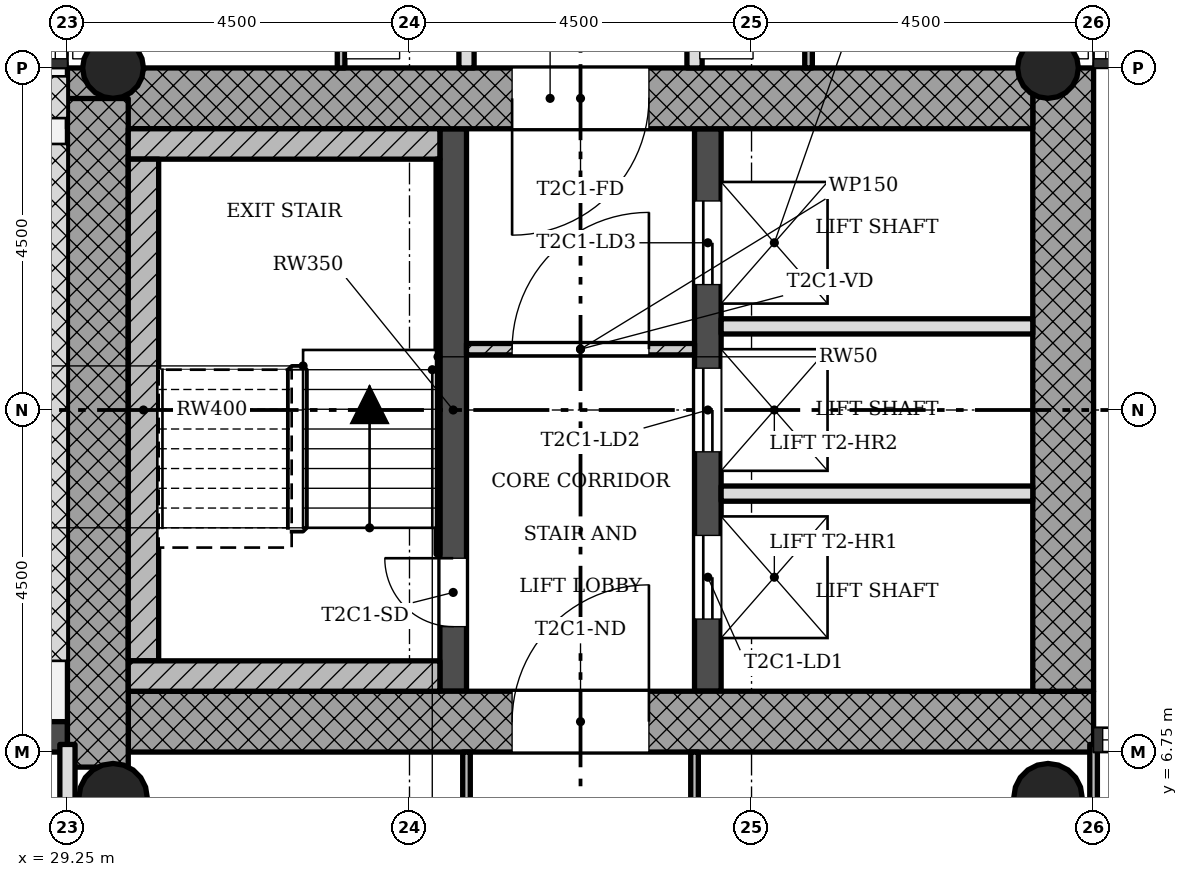
"""IFC4 building model, lengths in metres.
Left out: names, types, materials, properties, quantities, classifications, styles, units other than length and angle.
Written with IfcOpenShell. Run it as: python <this file> out.ifc"""

import sys

from ifc_helpers import new_model, si_unit, direction, frame, frame_2d, origin, origin_2d, place, context, subcontext, project, spatial, rectangle, hollow_circle, extrude, element, fill, save


model = new_model("IFC4")
c1 = context("Model", 3, precision=1e-05, world=origin(), true_north=direction((0.0, 1.0)))
c2 = subcontext(c1, "Body", "Model", "MODEL_VIEW")
j1 = project(units=[si_unit("LENGTHUNIT", "METRE"), si_unit("PLANEANGLEUNIT", "RADIAN")], contexts=[c1])
p1 = place(None, origin())
s1 = spatial("IfcSite", under=j1, at=p1, CompositionType="ELEMENT")
p2 = place(p1, origin())
s2 = spatial("IfcBuilding", under=s1, at=p2, CompositionType="ELEMENT")
p3 = place(p2, frame((0.0, 0.0, 167.7)))
s3 = spatial("IfcBuildingStorey", under=s2, at=p3, CompositionType="ELEMENT", Elevation=167.7)
p4 = place(p3, frame((30.05, 7.15, 0.0), z_axis=(0.0, 0.0, 1.0), x_axis=(1.0, 0.0, 0.0)))
e1 = element("IfcWall", 1, at=p4, inside=s3, PredefinedType="SHEAR", context=c2, shape_type="SweptSolid", body=[
    extrude(rectangle(XDim=12.7, YDim=0.8, at=frame_2d((6.35, 0.0))), origin(), (0.0, 0.0, 1.0), 3.4),
])
p5 = place(p4, frame((5.05, 0.0, 0.0)))
e2 = element("IfcOpeningElement", 2, at=p5, cuts=e1, PredefinedType="OPENING", context=c2, shape_type="SweptSolid", body=[
    extrude(rectangle(XDim=1.8, YDim=2.1, at=frame_2d((0.9, 1.05))), frame((0.0, 0.41, 0.0), z_axis=(0.0, -1.0, 0.0), x_axis=(1.0, 0.0, 0.0)), (0.0, 0.0, 1.0), 0.82),
])
p6 = place(p3, frame((42.35, 7.55, 0.0), z_axis=(0.0, 0.0, 1.0), x_axis=(0.0, 1.0, 0.0)))
e3 = element("IfcWall", 3, at=p6, inside=s3, PredefinedType="SHEAR", context=c2, shape_type="SweptSolid", body=[
    extrude(rectangle(XDim=8.2, YDim=0.8, at=frame_2d((4.1, 0.0))), origin(), (0.0, 0.0, 1.0), 3.4),
])
p7 = place(p3, frame((41.95, 15.35, 0.0), z_axis=(0.0, 0.0, 1.0), x_axis=(-1.0, 0.0, 0.0)))
e4 = element("IfcWall", 4, at=p7, inside=s3, PredefinedType="SHEAR", context=c2, shape_type="SweptSolid", body=[
    extrude(rectangle(XDim=12.7, YDim=0.8, at=frame_2d((6.35, 0.0))), origin(), (0.0, 0.0, 1.0), 3.4),
])
p8 = place(p7, frame((5.05, 0.0, 0.0)))
e5 = element("IfcOpeningElement", 5, at=p8, cuts=e4, PredefinedType="OPENING", context=c2, shape_type="SweptSolid", body=[
    extrude(rectangle(XDim=1.8, YDim=2.1, at=frame_2d((0.9, 1.05))), frame((0.0, 0.41, 0.0), z_axis=(0.0, -1.0, 0.0), x_axis=(1.0, 0.0, 0.0)), (0.0, 0.0, 1.0), 0.82),
])
p9 = place(p3, frame((29.65, 15.348, 0.0), z_axis=(0.0, 0.0, 1.0), x_axis=(0.0, -1.0, 0.0)))
e6 = element("IfcWall", 6, at=p9, inside=s3, PredefinedType="SHEAR", context=c2, shape_type="SweptSolid", body=[
    extrude(rectangle(XDim=8.796, YDim=0.8, at=frame_2d((4.398, 0.0))), origin(), (0.0, 0.0, 1.0), 3.4),
])
p10 = place(p3, frame((34.325, 7.55, 0.0), z_axis=(0.0, 0.0, 1.0), x_axis=(0.0, 1.0, 0.0)))
e7 = element("IfcWall", 7, at=p10, inside=s3, PredefinedType="SHEAR", context=c2, shape_type="SweptSolid", body=[
    extrude(rectangle(XDim=7.4, YDim=0.35, at=frame_2d((3.7, 0.0))), origin(), (0.0, 0.0, 1.0), 3.4),
])
p11 = place(p10, frame((0.85, 0.0, 0.0)))
e8 = element("IfcOpeningElement", 8, at=p11, cuts=e7, PredefinedType="OPENING", context=c2, shape_type="SweptSolid", body=[
    extrude(rectangle(XDim=0.9, YDim=2.1, at=frame_2d((0.45, 1.05))), frame((0.0, 0.185, 0.0), z_axis=(0.0, -1.0, 0.0), x_axis=(1.0, 0.0, 0.0)), (0.0, 0.0, 1.0), 0.37),
])
p12 = place(p3, frame((37.675, 7.55, 0.0), z_axis=(0.0, 0.0, 1.0), x_axis=(0.0, 1.0, 0.0)))
e9 = element("IfcWall", 9, at=p12, inside=s3, PredefinedType="SHEAR", context=c2, shape_type="SweptSolid", body=[
    extrude(rectangle(XDim=7.4, YDim=0.35, at=frame_2d((3.7, 0.0))), origin(), (0.0, 0.0, 1.0), 3.4),
])
p13 = place(p12, frame((0.95, 0.0, 0.0)))
e10 = element("IfcOpeningElement", 10, at=p13, cuts=e9, PredefinedType="OPENING", context=c2, shape_type="SweptSolid", body=[
    extrude(rectangle(XDim=1.1, YDim=2.1, at=frame_2d((0.55, 1.05))), frame((0.0, 0.185, 0.0), z_axis=(0.0, -1.0, 0.0), x_axis=(1.0, 0.0, 0.0)), (0.0, 0.0, 1.0), 0.37),
])
p14 = place(p12, frame((3.15, 0.0, 0.0)))
e11 = element("IfcOpeningElement", 11, at=p14, cuts=e9, PredefinedType="OPENING", context=c2, shape_type="SweptSolid", body=[
    extrude(rectangle(XDim=1.1, YDim=2.1, at=frame_2d((0.55, 1.05))), frame((0.0, 0.185, 0.0), z_axis=(0.0, -1.0, 0.0), x_axis=(1.0, 0.0, 0.0)), (0.0, 0.0, 1.0), 0.37),
])
p15 = place(p12, frame((5.35, 0.0, 0.0)))
e12 = element("IfcOpeningElement", 12, at=p15, cuts=e9, PredefinedType="OPENING", context=c2, shape_type="SweptSolid", body=[
    extrude(rectangle(XDim=1.1, YDim=2.1, at=frame_2d((0.55, 1.05))), frame((0.0, 0.185, 0.0), z_axis=(0.0, -1.0, 0.0), x_axis=(1.0, 0.0, 0.0)), (0.0, 0.0, 1.0), 0.37),
])
for number, where, z_axis, x_axis in (
    (13, (42.15, 15.75, 0.0), (0.0, 0.0, 1.0), (1.0, 0.0, 0.0)),
    (14, (29.85, 15.75, 0.0), (0.0, 0.0, 1.0), (1.0, 0.0, 0.0)),
):
    element("IfcColumn", number, at=place(p3, frame(where, z_axis=z_axis, x_axis=x_axis)), inside=s3, PredefinedType="COLUMN", context=c2, shape_type="SweptSolid", body=[
        extrude(hollow_circle(Radius=0.4, WallThickness=0.028, at=origin_2d()), origin(), (0.0, 0.0, 1.0), 3.4),
    ])
for number, where, z_axis, x_axis in (
    (15, (42.15, 6.15, 0.0), (0.0, 0.0, 1.0), (1.0, 0.0, 0.0)),
    (16, (29.85, 6.15, 0.0), (0.0, 0.0, 1.0), (1.0, 0.0, 0.0)),
):
    element("IfcColumn", number, at=place(p3, frame(where, z_axis=z_axis, x_axis=x_axis)), inside=s3, PredefinedType="COLUMN", context=c2, shape_type="SweptSolid", body=[
        extrude(hollow_circle(Radius=0.45, WallThickness=0.032, at=origin_2d()), origin(), (0.0, 0.0, 1.0), 3.4),
    ])
p16 = place(p3, frame((29.25, 6.95, -0.02), z_axis=(0.0, 0.0, 1.0), x_axis=(-1.0, 0.0, 0.0)))
e17 = element("IfcWall", 17, at=p16, inside=s3, PredefinedType="STANDARD", context=c2, shape_type="SweptSolid", body=[
    extrude(rectangle(XDim=4.5, YDim=0.4, at=frame_2d((2.25, 0.0))), origin(), (0.0, 0.0, 1.0), 3.12),
])
p17 = place(p16, frame((1.35, 0.0, 0.02)))
e18 = element("IfcOpeningElement", 18, at=p17, cuts=e17, PredefinedType="OPENING", context=c2, shape_type="SweptSolid", body=[
    extrude(rectangle(XDim=1.8, YDim=2.1, at=frame_2d((0.9, 1.05))), frame((0.0, 0.21, 0.0), z_axis=(0.0, -1.0, 0.0), x_axis=(1.0, 0.0, 0.0)), (0.0, 0.0, 1.0), 0.42),
])
p18 = place(p3, frame((37.5, 12.05, 0.0), z_axis=(0.0, 0.0, 1.0), x_axis=(-1.0, 0.0, 0.0)))
e19 = element("IfcWall", 19, at=p18, inside=s3, PredefinedType="PARTITIONING", context=c2, shape_type="SweptSolid", body=[
    extrude(rectangle(XDim=3.0, YDim=0.15, at=frame_2d((1.5, 0.0))), origin(), (0.0, 0.0, 1.0), 3.0),
])
p19 = place(p18, frame((0.6, 0.0, 0.0)))
e20 = element("IfcOpeningElement", 20, at=p19, cuts=e19, PredefinedType="OPENING", context=c2, shape_type="SweptSolid", body=[
    extrude(rectangle(XDim=1.8, YDim=2.1, at=frame_2d((0.9, 1.05))), frame((0.0, 0.085, 0.0), z_axis=(0.0, -1.0, 0.0), x_axis=(1.0, 0.0, 0.0)), (0.0, 0.0, 1.0), 0.17),
])
for number, where, z_axis, x_axis in (
    (21, (41.95, 10.15, 0.0), (0.0, 0.0, 1.0), (-1.0, 0.0, 0.0)),
    (22, (41.95, 12.35, 0.0), (0.0, 0.0, 1.0), (-1.0, 0.0, 0.0)),
):
    element("IfcWall", number, at=place(p3, frame(where, z_axis=z_axis, x_axis=x_axis)), inside=s3, PredefinedType="SOLIDWALL", context=c2, shape_type="SweptSolid", body=[
        extrude(rectangle(XDim=4.1, YDim=0.2, at=frame_2d((2.05, 0.0))), origin(), (0.0, 0.0, 1.0), 3.0),
    ])
p20 = place(p3, frame((42.75, 0.9, 0.0), z_axis=(0.0, 0.0, 1.0), x_axis=(0.0, 1.0, 0.0)))
e23 = element("IfcWall", 23, at=p20, inside=s3, PredefinedType="PARTITIONING", context=c2, shape_type="SweptSolid", body=[
    extrude(rectangle(XDim=5.95, YDim=0.1, at=frame_2d((2.975, 0.0))), origin(), (0.0, 0.0, 1.0), 3.0),
])
p21 = place(p3, frame((39.0, 15.75, 0.0), z_axis=(0.0, 0.0, 1.0), x_axis=(0.0, 1.0, 0.0)))
e24 = element("IfcWall", 24, at=p21, inside=s3, PredefinedType="PARTITIONING", context=c2, shape_type="SweptSolid", body=[
    extrude(rectangle(XDim=2.4, YDim=0.1, at=frame_2d((1.2, 0.0))), origin(), (0.0, 0.0, 1.0), 3.0),
])
p22 = place(p21, frame((0.75, 0.0, 0.0)))
e25 = element("IfcOpeningElement", 25, at=p22, cuts=e24, PredefinedType="OPENING", context=c2, shape_type="SweptSolid", body=[
    extrude(rectangle(XDim=0.9, YDim=2.1, at=frame_2d((0.45, 1.05))), frame((0.0, 0.06, 0.0), z_axis=(0.0, -1.0, 0.0), x_axis=(1.0, 0.0, 0.0)), (0.0, 0.0, 1.0), 0.12),
])
p23 = place(p3, frame((37.5, 4.5, 0.0), z_axis=(0.0, 0.0, 1.0), x_axis=(0.0, 1.0, 0.0)))
e26 = element("IfcWall", 26, at=p23, inside=s3, PredefinedType="PARTITIONING", context=c2, shape_type="SweptSolid", body=[
    extrude(rectangle(XDim=2.25, YDim=0.1, at=frame_2d((1.125, 0.0))), origin(), (0.0, 0.0, 1.0), 3.0),
])
p24 = place(p3, frame((37.5, 15.75, 0.0), z_axis=(0.0, 0.0, 1.0), x_axis=(0.0, 1.0, 0.0)))
e27 = element("IfcWall", 27, at=p24, inside=s3, PredefinedType="SOLIDWALL", context=c2, shape_type="SweptSolid", body=[
    extrude(rectangle(XDim=4.5, YDim=0.2, at=frame_2d((2.25, 0.0))), origin(), (0.0, 0.0, 1.0), 3.0),
])
p25 = place(p24, frame((3.0, 0.0, 0.0)))
e28 = element("IfcOpeningElement", 28, at=p25, cuts=e27, PredefinedType="OPENING", context=c2, shape_type="SweptSolid", body=[
    extrude(rectangle(XDim=0.9, YDim=2.1, at=frame_2d((0.45, 1.05))), frame((0.0, 0.11, 0.0), z_axis=(0.0, -1.0, 0.0), x_axis=(1.0, 0.0, 0.0)), (0.0, 0.0, 1.0), 0.22),
])
p26 = place(p3, frame((34.5, 4.5, 0.0), z_axis=(0.0, 0.0, 1.0), x_axis=(0.0, 1.0, 0.0)))
e29 = element("IfcWall", 29, at=p26, inside=s3, PredefinedType="PARTITIONING", context=c2, shape_type="SweptSolid", body=[
    extrude(rectangle(XDim=2.25, YDim=0.1, at=frame_2d((1.125, 0.0))), origin(), (0.0, 0.0, 1.0), 3.0),
])
p27 = place(p3, frame((34.5, 15.75, 0.0), z_axis=(0.0, 0.0, 1.0), x_axis=(0.0, 1.0, 0.0)))
e30 = element("IfcWall", 30, at=p27, inside=s3, PredefinedType="SOLIDWALL", context=c2, shape_type="SweptSolid", body=[
    extrude(rectangle(XDim=4.5, YDim=0.2, at=frame_2d((2.25, 0.0))), origin(), (0.0, 0.0, 1.0), 3.0),
])
p28 = place(p27, frame((3.0, 0.0, 0.0)))
e31 = element("IfcOpeningElement", 31, at=p28, cuts=e30, PredefinedType="OPENING", context=c2, shape_type="SweptSolid", body=[
    extrude(rectangle(XDim=0.9, YDim=2.1, at=frame_2d((0.45, 1.05))), frame((0.0, 0.11, 0.0), z_axis=(0.0, -1.0, 0.0), x_axis=(1.0, 0.0, 0.0)), (0.0, 0.0, 1.0), 0.22),
])
p29 = place(p3, frame((32.85, 15.75, 0.0), z_axis=(0.0, 0.0, 1.0), x_axis=(0.0, 1.0, 0.0)))
e32 = element("IfcWall", 32, at=p29, inside=s3, PredefinedType="PARTITIONING", context=c2, shape_type="SweptSolid", body=[
    extrude(rectangle(XDim=4.5, YDim=0.1, at=frame_2d((2.25, 0.0))), origin(), (0.0, 0.0, 1.0), 3.0),
])
p30 = place(p29, frame((3.0, 0.0, 0.0)))
e33 = element("IfcOpeningElement", 33, at=p30, cuts=e32, PredefinedType="OPENING", context=c2, shape_type="SweptSolid", body=[
    extrude(rectangle(XDim=0.9, YDim=2.1, at=frame_2d((0.45, 1.05))), frame((0.0, 0.06, 0.0), z_axis=(0.0, -1.0, 0.0), x_axis=(1.0, 0.0, 0.0)), (0.0, 0.0, 1.0), 0.12),
])
p31 = place(p3, frame((29.25, 0.9, 0.0), z_axis=(0.0, 0.0, 1.0), x_axis=(0.0, 1.0, 0.0)))
e34 = element("IfcWall", 34, at=p31, inside=s3, PredefinedType="SOLIDWALL", context=c2, shape_type="SweptSolid", body=[
    extrude(rectangle(XDim=5.95, YDim=0.2, at=frame_2d((2.975, 0.0))), origin(), (0.0, 0.0, 1.0), 3.0),
])
p32 = place(p3, frame((34.15, 14.75, 0.0), z_axis=(0.0, 0.0, 1.0), x_axis=(-1.0, 0.0, 0.0)))
e35 = element("IfcWall", 35, at=p32, inside=s3, PredefinedType="SHEAR", context=c2, shape_type="SweptSolid", body=[
    extrude(rectangle(XDim=4.1, YDim=0.4, at=frame_2d((2.05, 0.0))), origin(), (0.0, 0.0, 1.0), 3.4),
])
p33 = place(p3, frame((30.25, 7.95, 0.0), z_axis=(0.0, 0.0, 1.0), x_axis=(0.0, 1.0, 0.0)))
e36 = element("IfcWall", 36, at=p33, inside=s3, PredefinedType="SHEAR", context=c2, shape_type="SweptSolid", body=[
    extrude(rectangle(XDim=6.6, YDim=0.4, at=frame_2d((3.3, 0.0))), origin(), (0.0, 0.0, 1.0), 3.4),
])
p34 = place(p3, frame((34.15, 7.75, 0.0), z_axis=(0.0, 0.0, 1.0), x_axis=(-1.0, 0.0, 0.0)))
e37 = element("IfcWall", 37, at=p34, inside=s3, PredefinedType="SHEAR", context=c2, shape_type="SweptSolid", body=[
    extrude(rectangle(XDim=4.1, YDim=0.4, at=frame_2d((2.05, 0.0))), origin(), (0.0, 0.0, 1.0), 3.4),
])
p35 = place(p3, frame((34.125, 9.35, 0.0), z_axis=(0.0, 0.0, 1.0), x_axis=(0.0, 1.0, 0.0)))
e38 = element("IfcWall", 38, at=p35, inside=s3, PredefinedType="SHEAR", context=c2, shape_type="SweptSolid", body=[
    extrude(rectangle(XDim=5.2, YDim=0.05, at=frame_2d((2.6, 0.0))), origin(), (0.0, 0.0, 1.0), 3.4),
])
p36 = place(p19, origin())
e39 = element("IfcDoor", 39, at=p36, inside=s3, OperationType="SINGLE_SWING_LEFT", PredefinedType="DOOR", context=c2, shape_type="SweptSolid", body=[
    extrude(rectangle(XDim=1.8, YDim=2.1, at=frame_2d((0.9, 1.05))), frame((0.0, 0.025, 0.0), z_axis=(0.0, -1.0, 0.0), x_axis=(1.0, 0.0, 0.0)), (0.0, 0.0, 1.0), 0.05),
])
fill(e20, e39)
p37 = place(p11, origin())
e40 = element("IfcDoor", 40, at=p37, inside=s3, OperationType="SINGLE_SWING_LEFT", PredefinedType="DOOR", context=c2, shape_type="SweptSolid", body=[
    extrude(rectangle(XDim=0.9, YDim=2.1, at=frame_2d((0.45, 1.05))), frame((0.0, 0.025, 0.0), z_axis=(0.0, -1.0, 0.0), x_axis=(1.0, 0.0, 0.0)), (0.0, 0.0, 1.0), 0.05),
])
fill(e8, e40)
p38 = place(p13, origin())
e41 = element("IfcDoor", 41, at=p38, inside=s3, OperationType="SLIDING_TO_LEFT", PredefinedType="DOOR", context=c2, shape_type="SweptSolid", body=[
    extrude(rectangle(XDim=1.1, YDim=2.1, at=frame_2d((0.55, 1.05))), frame((0.0, 0.025, 0.0), z_axis=(0.0, -1.0, 0.0), x_axis=(1.0, 0.0, 0.0)), (0.0, 0.0, 1.0), 0.05),
])
fill(e10, e41)
p39 = place(p14, origin())
e42 = element("IfcDoor", 42, at=p39, inside=s3, OperationType="SLIDING_TO_LEFT", PredefinedType="DOOR", context=c2, shape_type="SweptSolid", body=[
    extrude(rectangle(XDim=1.1, YDim=2.1, at=frame_2d((0.55, 1.05))), frame((0.0, 0.025, 0.0), z_axis=(0.0, -1.0, 0.0), x_axis=(1.0, 0.0, 0.0)), (0.0, 0.0, 1.0), 0.05),
])
fill(e11, e42)
p40 = place(p15, origin())
e43 = element("IfcDoor", 43, at=p40, inside=s3, OperationType="SLIDING_TO_LEFT", PredefinedType="DOOR", context=c2, shape_type="SweptSolid", body=[
    extrude(rectangle(XDim=1.1, YDim=2.1, at=frame_2d((0.55, 1.05))), frame((0.0, 0.025, 0.0), z_axis=(0.0, -1.0, 0.0), x_axis=(1.0, 0.0, 0.0)), (0.0, 0.0, 1.0), 0.05),
])
fill(e12, e43)
p41 = place(p5, origin())
e44 = element("IfcDoor", 44, at=p41, inside=s3, OperationType="SINGLE_SWING_LEFT", PredefinedType="DOOR", context=c2, shape_type="SweptSolid", body=[
    extrude(rectangle(XDim=1.8, YDim=2.1, at=frame_2d((0.9, 1.05))), frame((0.0, 0.025, 0.0), z_axis=(0.0, -1.0, 0.0), x_axis=(1.0, 0.0, 0.0)), (0.0, 0.0, 1.0), 0.05),
])
fill(e2, e44)
p42 = place(p8, origin())
e45 = element("IfcDoor", 45, at=p42, inside=s3, OperationType="SINGLE_SWING_LEFT", PredefinedType="DOOR", context=c2, shape_type="SweptSolid", body=[
    extrude(rectangle(XDim=1.8, YDim=2.1, at=frame_2d((0.9, 1.05))), frame((0.0, 0.025, 0.0), z_axis=(0.0, -1.0, 0.0), x_axis=(1.0, 0.0, 0.0)), (0.0, 0.0, 1.0), 0.05),
])
fill(e5, e45)
save(model, sys.argv[1])
